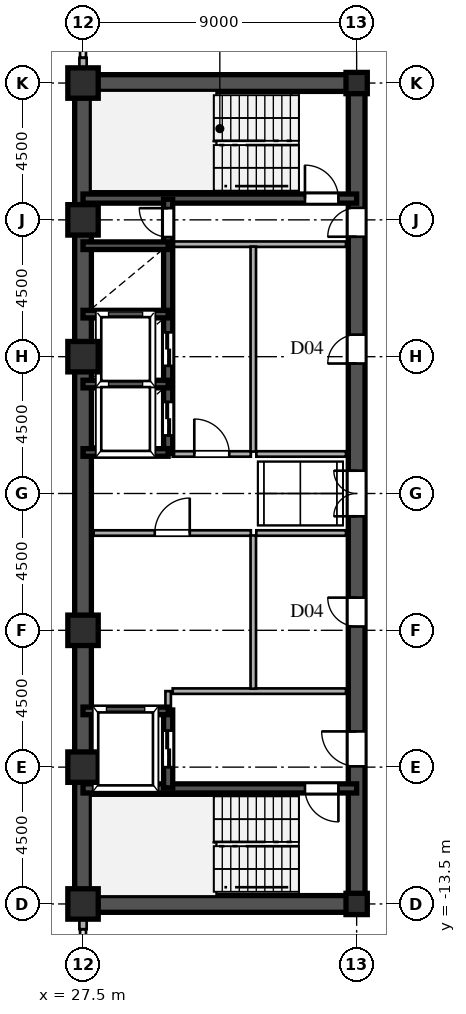
"""IFC4 building model, lengths in metres.
Left out: names, types, materials, properties, quantities, classifications, styles, units other than length and angle.
Written with IfcOpenShell. Run it as: python <this file> out.ifc"""

import sys

from ifc_helpers import new_model, si_unit, direction, frame, frame_2d, origin, origin_2d, place, context, subcontext, project, spatial, rectangle, hollow_rectangle, i_section, extrude, source, transform, mapped, element, fill, save


model = new_model("IFC4")
c1 = context("Model", 3, precision=1e-05, world=origin(), true_north=direction((0.0, 1.0)))
c2 = subcontext(c1, "Body", "Model", "MODEL_VIEW")
j1 = project(units=[si_unit("LENGTHUNIT", "METRE"), si_unit("PLANEANGLEUNIT", "RADIAN")], contexts=[c1])
p1 = place(None, origin())
s1 = spatial("IfcSite", under=j1, at=p1, CompositionType="ELEMENT")
p2 = place(p1, origin())
s2 = spatial("IfcBuilding", under=s1, at=p2, CompositionType="ELEMENT")
p3 = place(p2, frame((0.0, 0.0, 144.0)))
s3 = spatial("IfcBuildingStorey", under=s2, at=p3, CompositionType="ELEMENT", Elevation=144.0)
m1 = source(origin(), c2, "Body", "SweptSolid", [
    extrude(hollow_rectangle(XDim=1.0, YDim=1.0, WallThickness=0.042, at=origin_2d()), origin(), (0.0, 0.0, 1.0), 3.6),
])
for number, where, z_axis, x_axis in (
    (1, (27.5, -13.5, 0.0), (0.0, 0.0, 1.0), (1.0, 0.0, 0.0)),
    (2, (27.5, -9.0, 0.0), (0.0, 0.0, 1.0), (1.0, 0.0, 0.0)),
    (3, (27.5, -4.5, 0.0), (0.0, 0.0, 1.0), (1.0, 0.0, 0.0)),
    (4, (27.5, 4.5, 0.0), (0.0, 0.0, 1.0), (1.0, 0.0, 0.0)),
    (5, (27.5, 9.0, 0.0), (0.0, 0.0, 1.0), (1.0, 0.0, 0.0)),
    (6, (27.5, 13.5, 0.0), (0.0, 0.0, 1.0), (1.0, 0.0, 0.0)),
):
    element("IfcColumn", number, at=place(p3, frame(where, z_axis=z_axis, x_axis=x_axis)), inside=s3, PredefinedType="COLUMN", context=c2, shape_type="MappedRepresentation", body=[
        mapped(m1, transform((0.0, 0.0, 0.0), scale=1.0)),
    ])
m2 = source(origin(), c2, "Body", "SweptSolid", [
    extrude(i_section(OverallWidth=0.7, OverallDepth=0.7, WebThickness=0.028, FlangeThickness=0.045, at=origin_2d()), origin(), (0.0, 0.0, 1.0), 3.6),
])
for number, where, z_axis, x_axis in (
    (7, (36.5, -13.5, 0.0), (0.0, 0.0, 1.0), (1.0, 0.0, 0.0)),
    (8, (36.5, 13.5, 0.0), (0.0, 0.0, 1.0), (1.0, 0.0, 0.0)),
):
    element("IfcColumn", number, at=place(p3, frame(where, z_axis=z_axis, x_axis=x_axis)), inside=s3, PredefinedType="COLUMN", context=c2, shape_type="MappedRepresentation", body=[
        mapped(m2, transform((0.0, 0.0, 0.0), scale=1.0)),
    ])
for number, where, z_axis, x_axis in (
    (9, (27.5, -14.33, 0.0), (0.0, 0.0, 1.0), (0.0, 1.0, 0.0)),
    (10, (27.5, 13.78, 0.0), (0.0, 0.0, 1.0), (0.0, 1.0, 0.0)),
):
    element("IfcWall", number, at=place(p3, frame(where, z_axis=z_axis, x_axis=x_axis)), inside=s3, PredefinedType="SOLIDWALL", context=c2, shape_type="SweptSolid", body=[
        extrude(rectangle(XDim=0.55, YDim=0.24, at=frame_2d((0.275, 0.0))), origin(), (0.0, 0.0, 1.0), 2.88),
    ])
for number, where, z_axis, x_axis in (
    (11, (27.5, -13.5, 0.0), (0.0, 0.0, 1.0), (0.0, 1.0, 0.0)),
    (12, (27.5, 1.3, 0.0), (0.0, 0.0, 1.0), (0.0, 1.0, 0.0)),
):
    element("IfcWall", number, at=place(p3, frame(where, z_axis=z_axis, x_axis=x_axis)), inside=s3, PredefinedType="SHEAR", context=c2, shape_type="SweptSolid", body=[
        extrude(rectangle(XDim=12.2, YDim=0.55, at=frame_2d((6.1, 0.0))), origin(), (0.0, 0.0, 1.0), 3.38),
    ])
p4 = place(p3, frame((27.5, -1.3, 0.0), z_axis=(0.0, 0.0, 1.0), x_axis=(0.0, 1.0, 0.0)))
e13 = element("IfcWall", 13, at=p4, inside=s3, PredefinedType="SHEAR", context=c2, shape_type="SweptSolid", body=[
    extrude(rectangle(XDim=2.6, YDim=0.55, at=frame_2d((1.3, 0.0))), origin(), (0.0, 0.0, 1.0), 3.38),
])
for number, where, z_axis, x_axis in (
    (14, (27.5, -13.5, 0.0), (0.0, 0.0, 1.0), (1.0, 0.0, 0.0)),
    (15, (27.5, 13.5, 0.0), (0.0, 0.0, 1.0), (1.0, 0.0, 0.0)),
):
    element("IfcWall", number, at=place(p3, frame(where, z_axis=z_axis, x_axis=x_axis)), inside=s3, PredefinedType="SHEAR", context=c2, shape_type="SweptSolid", body=[
        extrude(rectangle(XDim=9.0, YDim=0.55, at=frame_2d((4.5, 0.0))), origin(), (0.0, 0.0, 1.0), 3.38),
    ])
p5 = place(p3, frame((36.5, -13.65, 0.0), z_axis=(0.0, 0.0, 1.0), x_axis=(0.0, 1.0, 0.0)))
e16 = element("IfcWall", 16, at=p5, inside=s3, PredefinedType="SHEAR", context=c2, shape_type="SweptSolid", body=[
    extrude(rectangle(XDim=7.15, YDim=0.55, at=frame_2d((3.575, 0.0))), origin(), (0.0, 0.0, 1.0), 3.38),
])
p6 = place(p5, frame((4.675, 0.0, 0.0)))
e17 = element("IfcOpeningElement", 17, at=p6, cuts=e16, PredefinedType="OPENING", context=c2, shape_type="SweptSolid", body=[
    extrude(rectangle(XDim=1.15, YDim=2.2, at=frame_2d((0.575, 1.1))), frame((0.0, 0.285, 0.0), z_axis=(0.0, -1.0, 0.0), x_axis=(1.0, 0.0, 0.0)), (0.0, 0.0, 1.0), 0.57),
])
p7 = place(p3, frame((36.5, -1.3, 0.0), z_axis=(0.0, 0.0, 1.0), x_axis=(0.0, 1.0, 0.0)))
e18 = element("IfcWall", 18, at=p7, inside=s3, PredefinedType="SHEAR", context=c2, shape_type="SweptSolid", body=[
    extrude(rectangle(XDim=2.6, YDim=0.55, at=frame_2d((1.3, 0.0))), origin(), (0.0, 0.0, 1.0), 3.38),
])
p8 = place(p7, frame((0.55, 0.0, 0.0)))
e19 = element("IfcOpeningElement", 19, at=p8, cuts=e18, PredefinedType="OPENING", context=c2, shape_type="SweptSolid", body=[
    extrude(rectangle(XDim=1.5, YDim=2.3, at=frame_2d((0.75, 1.15))), frame((0.0, 0.285, 0.0), z_axis=(0.0, -1.0, 0.0), x_axis=(1.0, 0.0, 0.0)), (0.0, 0.0, 1.0), 0.57),
])
p9 = place(p3, frame((36.5, 8.2, 0.0), z_axis=(0.0, 0.0, 1.0), x_axis=(0.0, 1.0, 0.0)))
e20 = element("IfcWall", 20, at=p9, inside=s3, PredefinedType="SHEAR", context=c2, shape_type="SweptSolid", body=[
    extrude(rectangle(XDim=5.45, YDim=0.55, at=frame_2d((2.725, 0.0))), origin(), (0.0, 0.0, 1.0), 3.38),
])
p10 = place(p9, frame((0.245, 0.0, 0.0)))
e21 = element("IfcOpeningElement", 21, at=p10, cuts=e20, PredefinedType="OPENING", context=c2, shape_type="SweptSolid", body=[
    extrude(rectangle(XDim=0.95, YDim=2.15, at=frame_2d((0.475, 1.075))), frame((0.0, 0.285, 0.0), z_axis=(0.0, -1.0, 0.0), x_axis=(1.0, 0.0, 0.0)), (0.0, 0.0, 1.0), 0.57),
])
p11 = place(p3, frame((36.5, -6.5, 0.0), z_axis=(0.0, 0.0, 1.0), x_axis=(0.0, 1.0, 0.0)))
e22 = element("IfcWall", 22, at=p11, inside=s3, PredefinedType="SHEAR", context=c2, shape_type="SweptSolid", body=[
    extrude(rectangle(XDim=5.2, YDim=0.55, at=frame_2d((2.6, 0.0))), origin(), (0.0, 0.0, 1.0), 3.38),
])
p12 = place(p11, frame((2.125, 0.0, 0.0)))
e23 = element("IfcOpeningElement", 23, at=p12, cuts=e22, PredefinedType="OPENING", context=c2, shape_type="SweptSolid", body=[
    extrude(rectangle(XDim=0.95, YDim=2.15, at=frame_2d((0.475, 1.075))), frame((0.0, 0.285, 0.0), z_axis=(0.0, -1.0, 0.0), x_axis=(1.0, 0.0, 0.0)), (0.0, 0.0, 1.0), 0.57),
])
p13 = place(p3, frame((36.5, 1.3, 0.0), z_axis=(0.0, 0.0, 1.0), x_axis=(0.0, 1.0, 0.0)))
e24 = element("IfcWall", 24, at=p13, inside=s3, PredefinedType="SHEAR", context=c2, shape_type="SweptSolid", body=[
    extrude(rectangle(XDim=6.9, YDim=0.55, at=frame_2d((3.45, 0.0))), origin(), (0.0, 0.0, 1.0), 3.38),
])
p14 = place(p13, frame((2.975, 0.0, 0.0)))
e25 = element("IfcOpeningElement", 25, at=p14, cuts=e24, PredefinedType="OPENING", context=c2, shape_type="SweptSolid", body=[
    extrude(rectangle(XDim=0.95, YDim=2.15, at=frame_2d((0.475, 1.075))), frame((0.0, 0.285, 0.0), z_axis=(0.0, -1.0, 0.0), x_axis=(1.0, 0.0, 0.0)), (0.0, 0.0, 1.0), 0.57),
])
p15 = place(p3, frame((27.5, -9.7, 0.0), z_axis=(0.0, 0.0, 1.0), x_axis=(1.0, 0.0, 0.0)))
e26 = element("IfcWall", 26, at=p15, inside=s3, PredefinedType="SHEAR", context=c2, shape_type="SweptSolid", body=[
    extrude(rectangle(XDim=9.0, YDim=0.3, at=frame_2d((4.5, 0.0))), origin(), (0.0, 0.0, 1.0), 3.38),
])
p16 = place(p15, frame((7.3, 0.0, 0.0)))
e27 = element("IfcOpeningElement", 27, at=p16, cuts=e26, PredefinedType="OPENING", context=c2, shape_type="SweptSolid", body=[
    extrude(rectangle(XDim=1.1, YDim=2.2, at=frame_2d((0.55, 1.1))), frame((0.0, 0.16, 0.0), z_axis=(0.0, -1.0, 0.0), x_axis=(1.0, 0.0, 0.0)), (0.0, 0.0, 1.0), 0.32),
])
p17 = place(p3, frame((27.5, 9.7, 0.0), z_axis=(0.0, 0.0, 1.0), x_axis=(1.0, 0.0, 0.0)))
e28 = element("IfcWall", 28, at=p17, inside=s3, PredefinedType="SHEAR", context=c2, shape_type="SweptSolid", body=[
    extrude(rectangle(XDim=9.0, YDim=0.3, at=frame_2d((4.5, 0.0))), origin(), (0.0, 0.0, 1.0), 3.38),
])
p18 = place(p17, frame((7.3, 0.0, 0.0)))
e29 = element("IfcOpeningElement", 29, at=p18, cuts=e28, PredefinedType="OPENING", context=c2, shape_type="SweptSolid", body=[
    extrude(rectangle(XDim=1.1, YDim=2.2, at=frame_2d((0.55, 1.1))), frame((0.0, 0.16, 0.0), z_axis=(0.0, -1.0, 0.0), x_axis=(1.0, 0.0, 0.0)), (0.0, 0.0, 1.0), 0.32),
])
for number, where, z_axis, x_axis in (
    (30, (27.5, -7.15, 0.0), (0.0, 0.0, 1.0), (1.0, 0.0, 0.0)),
    (31, (27.5, 1.35, 0.0), (0.0, 0.0, 1.0), (1.0, 0.0, 0.0)),
    (32, (27.5, 3.6, 0.0), (0.0, 0.0, 1.0), (1.0, 0.0, 0.0)),
    (33, (27.5, 5.9, 0.0), (0.0, 0.0, 1.0), (1.0, 0.0, 0.0)),
    (34, (27.5, 8.15, 0.0), (0.0, 0.0, 1.0), (1.0, 0.0, 0.0)),
):
    element("IfcWall", number, at=place(p3, frame(where, z_axis=z_axis, x_axis=x_axis)), inside=s3, PredefinedType="SHEAR", context=c2, shape_type="SweptSolid", body=[
        extrude(rectangle(XDim=2.8, YDim=0.25, at=frame_2d((1.4, 0.0))), origin(), (0.0, 0.0, 1.0), 3.38),
    ])
p19 = place(p3, frame((30.3, -9.68, 0.0), z_axis=(0.0, 0.0, 1.0), x_axis=(0.0, 1.0, 0.0)))
e35 = element("IfcWall", 35, at=p19, inside=s3, PredefinedType="SHEAR", context=c2, shape_type="SweptSolid", body=[
    extrude(rectangle(XDim=2.56, YDim=0.3, at=frame_2d((1.28, 0.0))), origin(), (0.0, 0.0, 1.0), 3.38),
])
p20 = place(p19, frame((0.68, 0.0, 0.0)))
e36 = element("IfcOpeningElement", 36, at=p20, cuts=e35, PredefinedType="OPENING", context=c2, shape_type="SweptSolid", body=[
    extrude(rectangle(XDim=1.2, YDim=2.25, at=frame_2d((0.6, 1.125))), frame((0.0, 0.16, 0.0), z_axis=(0.0, -1.0, 0.0), x_axis=(1.0, 0.0, 0.0)), (0.0, 0.0, 1.0), 0.32),
])
p21 = place(p3, frame((30.3, 1.32, 0.0), z_axis=(0.0, 0.0, 1.0), x_axis=(0.0, 1.0, 0.0)))
e37 = element("IfcWall", 37, at=p21, inside=s3, PredefinedType="SHEAR", context=c2, shape_type="SweptSolid", body=[
    extrude(rectangle(XDim=2.28, YDim=0.3, at=frame_2d((1.14, 0.0))), origin(), (0.0, 0.0, 1.0), 3.38),
])
p22 = place(p21, frame((0.59, 0.0, 0.0)))
e38 = element("IfcOpeningElement", 38, at=p22, cuts=e37, PredefinedType="OPENING", context=c2, shape_type="SweptSolid", body=[
    extrude(rectangle(XDim=1.1, YDim=2.2, at=frame_2d((0.55, 1.1))), frame((0.0, 0.16, 0.0), z_axis=(0.0, -1.0, 0.0), x_axis=(1.0, 0.0, 0.0)), (0.0, 0.0, 1.0), 0.32),
])
p23 = place(p3, frame((30.3, 3.6, 0.0), z_axis=(0.0, 0.0, 1.0), x_axis=(0.0, 1.0, 0.0)))
e39 = element("IfcWall", 39, at=p23, inside=s3, PredefinedType="SHEAR", context=c2, shape_type="SweptSolid", body=[
    extrude(rectangle(XDim=2.3, YDim=0.3, at=frame_2d((1.15, 0.0))), origin(), (0.0, 0.0, 1.0), 3.38),
])
p24 = place(p23, frame((0.6, 0.0, 0.0)))
e40 = element("IfcOpeningElement", 40, at=p24, cuts=e39, PredefinedType="OPENING", context=c2, shape_type="SweptSolid", body=[
    extrude(rectangle(XDim=1.1, YDim=2.2, at=frame_2d((0.55, 1.1))), frame((0.0, 0.16, 0.0), z_axis=(0.0, -1.0, 0.0), x_axis=(1.0, 0.0, 0.0)), (0.0, 0.0, 1.0), 0.32),
])
p25 = place(p3, frame((30.3, 5.9, 0.0), z_axis=(0.0, 0.0, 1.0), x_axis=(0.0, 1.0, 0.0)))
e41 = element("IfcWall", 41, at=p25, inside=s3, PredefinedType="SHEAR", context=c2, shape_type="SweptSolid", body=[
    extrude(rectangle(XDim=2.25, YDim=0.3, at=frame_2d((1.125, 0.0))), origin(), (0.0, 0.0, 1.0), 3.38),
])
p26 = place(p3, frame((30.3, 8.15, 0.0), z_axis=(0.0, 0.0, 1.0), x_axis=(0.0, 1.0, 0.0)))
e42 = element("IfcWall", 42, at=p26, inside=s3, PredefinedType="SHEAR", context=c2, shape_type="SweptSolid", body=[
    extrude(rectangle(XDim=1.53, YDim=0.3, at=frame_2d((0.765, 0.0))), origin(), (0.0, 0.0, 1.0), 3.38),
])
p27 = place(p26, frame((0.285, 0.0, 0.0)))
e43 = element("IfcOpeningElement", 43, at=p27, cuts=e42, PredefinedType="OPENING", context=c2, shape_type="SweptSolid", body=[
    extrude(rectangle(XDim=0.95, YDim=2.15, at=frame_2d((0.475, 1.075))), frame((0.0, 0.16, 0.0), z_axis=(0.0, -1.0, 0.0), x_axis=(1.0, 0.0, 0.0)), (0.0, 0.0, 1.0), 0.32),
])
p28 = place(p3, frame((30.45, -6.5, 0.0), z_axis=(0.0, 0.0, 1.0), x_axis=(1.0, 0.0, 0.0)))
e44 = element("IfcWall", 44, at=p28, inside=s3, PredefinedType="PARTITIONING", context=c2, shape_type="SweptSolid", body=[
    extrude(rectangle(XDim=5.7, YDim=0.18, at=frame_2d((2.85, 0.0))), origin(), (0.0, 0.0, 1.0), 3.38),
])
p29 = place(p3, frame((30.3, -7.12, 0.0), z_axis=(0.0, 0.0, 1.0), x_axis=(0.0, 1.0, 0.0)))
e45 = element("IfcWall", 45, at=p29, inside=s3, PredefinedType="PARTITIONING", context=c2, shape_type="SweptSolid", body=[
    extrude(rectangle(XDim=0.62, YDim=0.18, at=frame_2d((0.31, 0.0))), origin(), (0.0, 0.0, 1.0), 3.38),
])
p30 = place(p3, frame((30.45, 8.2, 0.0), z_axis=(0.0, 0.0, 1.0), x_axis=(1.0, 0.0, 0.0)))
e46 = element("IfcWall", 46, at=p30, inside=s3, PredefinedType="PARTITIONING", context=c2, shape_type="SweptSolid", body=[
    extrude(rectangle(XDim=5.7, YDim=0.18, at=frame_2d((2.85, 0.0))), origin(), (0.0, 0.0, 1.0), 3.38),
])
p31 = place(p3, frame((33.1, -6.42, 0.0), z_axis=(0.0, 0.0, 1.0), x_axis=(0.0, 1.0, 0.0)))
e47 = element("IfcWall", 47, at=p31, inside=s3, PredefinedType="PARTITIONING", context=c2, shape_type="SweptSolid", body=[
    extrude(rectangle(XDim=5.04, YDim=0.18, at=frame_2d((2.52, 0.0))), origin(), (0.0, 0.0, 1.0), 3.38),
])
p32 = place(p3, frame((33.1, 1.38, 0.0), z_axis=(0.0, 0.0, 1.0), x_axis=(0.0, 1.0, 0.0)))
e48 = element("IfcWall", 48, at=p32, inside=s3, PredefinedType="PARTITIONING", context=c2, shape_type="SweptSolid", body=[
    extrude(rectangle(XDim=6.74, YDim=0.18, at=frame_2d((3.37, 0.0))), origin(), (0.0, 0.0, 1.0), 3.38),
])
p33 = place(p3, frame((27.85, -1.3, 0.0), z_axis=(0.0, 0.0, 1.0), x_axis=(1.0, 0.0, 0.0)))
e49 = element("IfcWall", 49, at=p33, inside=s3, PredefinedType="PARTITIONING", context=c2, shape_type="SweptSolid", body=[
    extrude(rectangle(XDim=5.17, YDim=0.18, at=frame_2d((2.585, 0.0))), origin(), (0.0, 0.0, 1.0), 3.38),
])
p34 = place(p33, frame((2.01, 0.0, 0.0)))
e50 = element("IfcOpeningElement", 50, at=p34, cuts=e49, PredefinedType="OPENING", context=c2, shape_type="SweptSolid", body=[
    extrude(rectangle(XDim=1.15, YDim=2.2, at=frame_2d((0.575, 1.1))), frame((0.0, 0.1, 0.0), z_axis=(0.0, -1.0, 0.0), x_axis=(1.0, 0.0, 0.0)), (0.0, 0.0, 1.0), 0.2),
])
p35 = place(p3, frame((30.45, 1.3, 0.0), z_axis=(0.0, 0.0, 1.0), x_axis=(1.0, 0.0, 0.0)))
e51 = element("IfcWall", 51, at=p35, inside=s3, PredefinedType="PARTITIONING", context=c2, shape_type="SweptSolid", body=[
    extrude(rectangle(XDim=2.57, YDim=0.18, at=frame_2d((1.285, 0.0))), origin(), (0.0, 0.0, 1.0), 3.38),
])
p36 = place(p35, frame((0.71, 0.0, 0.0)))
e52 = element("IfcOpeningElement", 52, at=p36, cuts=e51, PredefinedType="OPENING", context=c2, shape_type="SweptSolid", body=[
    extrude(rectangle(XDim=1.15, YDim=2.2, at=frame_2d((0.575, 1.1))), frame((0.0, 0.1, 0.0), z_axis=(0.0, -1.0, 0.0), x_axis=(1.0, 0.0, 0.0)), (0.0, 0.0, 1.0), 0.2),
])
for number, where, z_axis, x_axis in (
    (53, (33.2, -1.3, 0.0), (0.0, 0.0, 1.0), (1.0, 0.0, 0.0)),
    (54, (33.2, 1.3, 0.0), (0.0, 0.0, 1.0), (1.0, 0.0, 0.0)),
):
    element("IfcWall", number, at=place(p3, frame(where, z_axis=z_axis, x_axis=x_axis)), inside=s3, PredefinedType="PARTITIONING", context=c2, shape_type="SweptSolid", body=[
        extrude(rectangle(XDim=2.95, YDim=0.18, at=frame_2d((1.475, 0.0))), origin(), (0.0, 0.0, 1.0), 3.38),
    ])
m3 = source(origin(), c2, "Body", "SweptSolid", [
    extrude(rectangle(XDim=1.15, YDim=2.2, at=frame_2d((0.575, 1.1))), frame((0.0, 0.025, 0.0), z_axis=(0.0, -1.0, 0.0), x_axis=(1.0, 0.0, 0.0)), (0.0, 0.0, 1.0), 0.05),
])
p37 = place(p6, origin())
e55 = element("IfcDoor", 55, at=p37, inside=s3, OperationType="SINGLE_SWING_RIGHT", PredefinedType="DOOR", context=c2, shape_type="MappedRepresentation", body=[
    mapped(m3, transform((0.0, 0.0, 0.0), scale=1.0)),
])
fill(e17, e55)
m4 = source(origin(), c2, "Body", "SweptSolid", [
    extrude(rectangle(XDim=1.5, YDim=2.3, at=frame_2d((0.75, 1.15))), frame((0.0, 0.025, 0.0), z_axis=(0.0, -1.0, 0.0), x_axis=(1.0, 0.0, 0.0)), (0.0, 0.0, 1.0), 0.05),
])
p38 = place(p8, origin())
e56 = element("IfcDoor", 56, at=p38, inside=s3, OperationType="DOUBLE_SWING_LEFT", PredefinedType="DOOR", context=c2, shape_type="MappedRepresentation", body=[
    mapped(m4, transform((0.0, 0.0, 0.0), scale=1.0)),
])
fill(e19, e56)
m5 = source(origin(), c2, "Body", "SweptSolid", [
    extrude(rectangle(XDim=0.95, YDim=2.15, at=frame_2d((0.475, 1.075))), frame((0.0, 0.025, 0.0), z_axis=(0.0, -1.0, 0.0), x_axis=(1.0, 0.0, 0.0)), (0.0, 0.0, 1.0), 0.05),
])
p39 = place(p10, origin())
e57 = element("IfcDoor", 57, at=p39, inside=s3, OperationType="SINGLE_SWING_LEFT", PredefinedType="DOOR", context=c2, shape_type="MappedRepresentation", body=[
    mapped(m5, transform((0.0, 0.0, 0.0), scale=1.0)),
])
fill(e21, e57)
p40 = place(p12, origin())
e58 = element("IfcDoor", 58, at=p40, inside=s3, OperationType="SINGLE_SWING_RIGHT", PredefinedType="DOOR", context=c2, shape_type="MappedRepresentation", body=[
    mapped(m5, transform((0.0, 0.0, 0.0), scale=1.0)),
])
fill(e23, e58)
p41 = place(p14, origin())
e59 = element("IfcDoor", 59, at=p41, inside=s3, OperationType="SINGLE_SWING_LEFT", PredefinedType="DOOR", context=c2, shape_type="MappedRepresentation", body=[
    mapped(m5, transform((0.0, 0.0, 0.0), scale=1.0)),
])
fill(e25, e59)
m6 = source(origin(), c2, "Body", "SweptSolid", [
    extrude(rectangle(XDim=1.1, YDim=2.2, at=frame_2d((0.55, 1.1))), frame((0.0, 0.025, 0.0), z_axis=(0.0, -1.0, 0.0), x_axis=(1.0, 0.0, 0.0)), (0.0, 0.0, 1.0), 0.05),
])
p42 = place(p16, frame((1.1, 0.0, 0.0), z_axis=(0.0, 0.0, 1.0), x_axis=(-1.0, 0.0, 0.0)))
e60 = element("IfcDoor", 60, at=p42, inside=s3, OperationType="SINGLE_SWING_RIGHT", PredefinedType="DOOR", context=c2, shape_type="MappedRepresentation", body=[
    mapped(m6, transform((0.0, 0.0, 0.0), scale=1.0)),
])
fill(e27, e60)
p43 = place(p18, origin())
e61 = element("IfcDoor", 61, at=p43, inside=s3, OperationType="SINGLE_SWING_LEFT", PredefinedType="DOOR", context=c2, shape_type="MappedRepresentation", body=[
    mapped(m6, transform((0.0, 0.0, 0.0), scale=1.0)),
])
fill(e29, e61)
m7 = source(origin(), c2, "Body", "SweptSolid", [
    extrude(rectangle(XDim=1.2, YDim=2.25, at=frame_2d((0.6, 1.125))), frame((0.0, 0.025, 0.0), z_axis=(0.0, -1.0, 0.0), x_axis=(1.0, 0.0, 0.0)), (0.0, 0.0, 1.0), 0.05),
])
p44 = place(p20, origin())
e62 = element("IfcDoor", 62, at=p44, inside=s3, OperationType="DOUBLE_DOOR_SLIDING", PredefinedType="DOOR", context=c2, shape_type="MappedRepresentation", body=[
    mapped(m7, transform((0.0, 0.0, 0.0), scale=1.0)),
])
fill(e36, e62)
m8 = source(origin(), c2, "Body", "SweptSolid", [
    extrude(rectangle(XDim=1.1, YDim=2.2, at=frame_2d((0.55, 1.1))), frame((0.0, 0.025, 0.0), z_axis=(0.0, -1.0, 0.0), x_axis=(1.0, 0.0, 0.0)), (0.0, 0.0, 1.0), 0.05),
])
p45 = place(p22, origin())
e63 = element("IfcDoor", 63, at=p45, inside=s3, OperationType="DOUBLE_DOOR_SLIDING", PredefinedType="DOOR", context=c2, shape_type="MappedRepresentation", body=[
    mapped(m8, transform((0.0, 0.0, 0.0), scale=1.0)),
])
fill(e38, e63)
p46 = place(p24, origin())
e64 = element("IfcDoor", 64, at=p46, inside=s3, OperationType="DOUBLE_DOOR_SLIDING", PredefinedType="DOOR", context=c2, shape_type="MappedRepresentation", body=[
    mapped(m8, transform((0.0, 0.0, 0.0), scale=1.0)),
])
fill(e40, e64)
p47 = place(p27, origin())
e65 = element("IfcDoor", 65, at=p47, inside=s3, OperationType="SINGLE_SWING_RIGHT", PredefinedType="DOOR", context=c2, shape_type="MappedRepresentation", body=[
    mapped(m5, transform((0.0, 0.0, 0.0), scale=1.0)),
])
fill(e43, e65)
p48 = place(p34, origin())
e66 = element("IfcDoor", 66, at=p48, inside=s3, OperationType="SINGLE_SWING_RIGHT", PredefinedType="DOOR", context=c2, shape_type="MappedRepresentation", body=[
    mapped(m3, transform((0.0, 0.0, 0.0), scale=1.0)),
])
fill(e50, e66)
p49 = place(p36, origin())
e67 = element("IfcDoor", 67, at=p49, inside=s3, OperationType="SINGLE_SWING_LEFT", PredefinedType="DOOR", context=c2, shape_type="MappedRepresentation", body=[
    mapped(m3, transform((0.0, 0.0, 0.0), scale=1.0)),
])
fill(e52, e67)
save(model, sys.argv[1])
